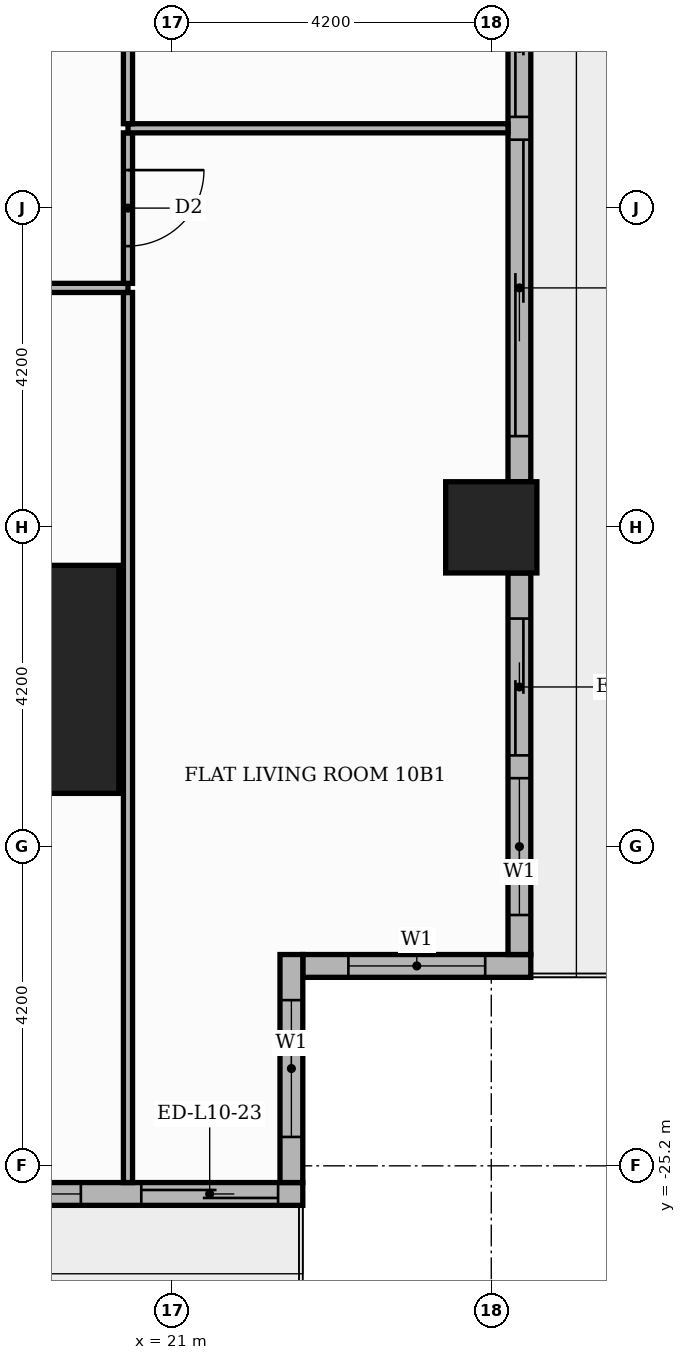
"""IFC4 building model, lengths in metres.
Left out: names, types, materials, properties, quantities, classifications, styles, units other than length and angle.
Written with IfcOpenShell. Run it as: python <this file> out.ifc"""

import sys

from ifc_helpers import new_model, si_unit, direction, frame, frame_2d, origin, origin_2d, place, context, subcontext, project, spatial, rectangle, extrude, element, fill, save


model = new_model("IFC4")
c1 = context("Model", 3, precision=1e-05, world=origin(), true_north=direction((0.0, 1.0)))
c2 = subcontext(c1, "Body", "Model", "MODEL_VIEW")
j1 = project(units=[si_unit("LENGTHUNIT", "METRE"), si_unit("PLANEANGLEUNIT", "RADIAN")], contexts=[c1])
p1 = place(None, origin())
s1 = spatial("IfcSite", under=j1, at=p1, CompositionType="ELEMENT")
p2 = place(p1, origin())
s2 = spatial("IfcBuilding", under=s1, at=p2, CompositionType="ELEMENT")
p3 = place(p2, frame((0.0, 0.0, 46.5)))
s3 = spatial("IfcBuildingStorey", under=s2, at=p3, CompositionType="ELEMENT", Elevation=46.5)
p4 = place(p3, frame((18.8, -18.8, 0.0), z_axis=(0.0, 0.0, 1.0), x_axis=(1.0, 0.0, 0.0)))
e1 = element("IfcColumn", 1, at=p4, inside=s3, PredefinedType="COLUMN", context=c2, shape_type="SweptSolid", body=[
    extrude(rectangle(XDim=3.0, YDim=3.0, at=origin_2d()), origin(), (0.0, 0.0, 1.0), 3.9),
])
p5 = place(p3, frame((25.2, -16.8, 0.0), z_axis=(0.0, 0.0, 1.0), x_axis=(1.0, 0.0, 0.0)))
e2 = element("IfcColumn", 2, at=p5, inside=s3, PredefinedType="COLUMN", context=c2, shape_type="SweptSolid", body=[
    extrude(rectangle(XDim=1.2, YDim=1.2, at=origin_2d()), origin(), (0.0, 0.0, 1.0), 3.9),
])
p6 = place(p3, frame((22.72, -22.57, 0.0), z_axis=(0.0, 0.0, 1.0), x_axis=(1.0, 0.0, 0.0)))
e3 = element("IfcWall", 3, at=p6, inside=s3, PredefinedType="STANDARD", context=c2, shape_type="SweptSolid", body=[
    extrude(rectangle(XDim=3.0, YDim=0.3, at=frame_2d((1.5, 0.0))), origin(), (0.0, 0.0, 1.0), 3.48),
])
p7 = place(p6, frame((0.6, 0.0, 0.9)))
e4 = element("IfcOpeningElement", 4, at=p7, cuts=e3, PredefinedType="OPENING", context=c2, shape_type="SweptSolid", body=[
    extrude(rectangle(XDim=1.8, YDim=2.1, at=frame_2d((0.9, 1.05))), frame((0.0, 0.16, 0.0), z_axis=(0.0, -1.0, 0.0), x_axis=(1.0, 0.0, 0.0)), (0.0, 0.0, 1.0), 0.32),
])
p8 = place(p3, frame((25.57, -22.42, 0.0), z_axis=(0.0, 0.0, 1.0), x_axis=(0.0, 1.0, 0.0)))
e5 = element("IfcWall", 5, at=p8, inside=s3, PredefinedType="STANDARD", context=c2, shape_type="SweptSolid", body=[
    extrude(rectangle(XDim=5.02, YDim=0.3, at=frame_2d((2.51, 0.0))), origin(), (0.0, 0.0, 1.0), 3.48),
])
p9 = place(p8, frame((0.52, 0.0, 0.9)))
e6 = element("IfcOpeningElement", 6, at=p9, cuts=e5, PredefinedType="OPENING", context=c2, shape_type="SweptSolid", body=[
    extrude(rectangle(XDim=1.8, YDim=2.1, at=frame_2d((0.9, 1.05))), frame((0.0, 0.16, 0.0), z_axis=(0.0, -1.0, 0.0), x_axis=(1.0, 0.0, 0.0)), (0.0, 0.0, 1.0), 0.32),
])
p10 = place(p8, frame((2.62, 0.0, 0.0)))
e7 = element("IfcOpeningElement", 7, at=p10, cuts=e5, PredefinedType="OPENING", context=c2, shape_type="SweptSolid", body=[
    extrude(rectangle(XDim=1.8, YDim=2.4, at=frame_2d((0.9, 1.2))), frame((0.0, 0.16, 0.0), z_axis=(0.0, -1.0, 0.0), x_axis=(1.0, 0.0, 0.0)), (0.0, 0.0, 1.0), 0.32),
])
p11 = place(p3, frame((25.57, -16.2, 0.0), z_axis=(0.0, 0.0, 1.0), x_axis=(0.0, 1.0, 0.0)))
e8 = element("IfcWall", 8, at=p11, inside=s3, PredefinedType="STANDARD", context=c2, shape_type="SweptSolid", body=[
    extrude(rectangle(XDim=7.2, YDim=0.3, at=frame_2d((3.6, 0.0))), origin(), (0.0, 0.0, 1.0), 3.48),
])
p12 = place(p11, frame((0.6, 0.0, 0.0)))
e9 = element("IfcOpeningElement", 9, at=p12, cuts=e8, PredefinedType="OPENING", context=c2, shape_type="SweptSolid", body=[
    extrude(rectangle(XDim=3.9, YDim=2.4, at=frame_2d((1.95, 1.2))), frame((0.0, 0.16, 0.0), z_axis=(0.0, -1.0, 0.0), x_axis=(1.0, 0.0, 0.0)), (0.0, 0.0, 1.0), 0.32),
])
p13 = place(p11, frame((4.8, 0.0, 0.0)))
e10 = element("IfcOpeningElement", 10, at=p13, cuts=e8, PredefinedType="OPENING", context=c2, shape_type="SweptSolid", body=[
    extrude(rectangle(XDim=1.8, YDim=2.4, at=frame_2d((0.9, 1.2))), frame((0.0, 0.16, 0.0), z_axis=(0.0, -1.0, 0.0), x_axis=(1.0, 0.0, 0.0)), (0.0, 0.0, 1.0), 0.32),
])
p14 = place(p3, frame((17.4, -25.57, 0.0), z_axis=(0.0, 0.0, 1.0), x_axis=(1.0, 0.0, 0.0)))
e11 = element("IfcWall", 11, at=p14, inside=s3, PredefinedType="STANDARD", context=c2, shape_type="SweptSolid", body=[
    extrude(rectangle(XDim=5.32, YDim=0.3, at=frame_2d((2.66, 0.0))), origin(), (0.0, 0.0, 1.0), 3.48),
])
p15 = place(p14, frame((0.6, 0.0, 0.9)))
e12 = element("IfcOpeningElement", 12, at=p15, cuts=e11, PredefinedType="OPENING", context=c2, shape_type="SweptSolid", body=[
    extrude(rectangle(XDim=1.8, YDim=2.1, at=frame_2d((0.9, 1.05))), frame((0.0, 0.16, 0.0), z_axis=(0.0, -1.0, 0.0), x_axis=(1.0, 0.0, 0.0)), (0.0, 0.0, 1.0), 0.32),
])
p16 = place(p14, frame((3.195, 0.0, 0.0)))
e13 = element("IfcOpeningElement", 13, at=p16, cuts=e11, PredefinedType="OPENING", context=c2, shape_type="SweptSolid", body=[
    extrude(rectangle(XDim=1.8, YDim=2.4, at=frame_2d((0.9, 1.2))), frame((0.0, 0.16, 0.0), z_axis=(0.0, -1.0, 0.0), x_axis=(1.0, 0.0, 0.0)), (0.0, 0.0, 1.0), 0.32),
])
p17 = place(p3, frame((22.57, -25.42, 0.0), z_axis=(0.0, 0.0, 1.0), x_axis=(0.0, 1.0, 0.0)))
e14 = element("IfcWall", 14, at=p17, inside=s3, PredefinedType="STANDARD", context=c2, shape_type="SweptSolid", body=[
    extrude(rectangle(XDim=3.0, YDim=0.3, at=frame_2d((1.5, 0.0))), origin(), (0.0, 0.0, 1.0), 3.48),
])
p18 = place(p17, frame((0.6, 0.0, 0.9)))
e15 = element("IfcOpeningElement", 15, at=p18, cuts=e14, PredefinedType="OPENING", context=c2, shape_type="SweptSolid", body=[
    extrude(rectangle(XDim=1.8, YDim=2.1, at=frame_2d((0.9, 1.05))), frame((0.0, 0.16, 0.0), z_axis=(0.0, -1.0, 0.0), x_axis=(1.0, 0.0, 0.0)), (0.0, 0.0, 1.0), 0.32),
])
p19 = place(p3, frame((20.42, -25.42, 0.0), z_axis=(0.0, 0.0, 1.0), x_axis=(0.0, 1.0, 0.0)))
e16 = element("IfcWall", 16, at=p19, inside=s3, PredefinedType="PARTITIONING", context=c2, shape_type="SweptSolid", body=[
    extrude(rectangle(XDim=11.71, YDim=0.12, at=frame_2d((5.855, 0.0))), origin(), (0.0, 0.0, 1.0), 3.48),
])
p20 = place(p3, frame((13.65, -13.65, 0.0), z_axis=(0.0, 0.0, 1.0), x_axis=(1.0, 0.0, 0.0)))
e17 = element("IfcWall", 17, at=p20, inside=s3, PredefinedType="PARTITIONING", context=c2, shape_type="SweptSolid", body=[
    extrude(rectangle(XDim=6.77, YDim=0.12, at=frame_2d((3.385, 0.0))), origin(), (0.0, 0.0, 1.0), 3.48),
])
p21 = place(p20, frame((2.885, 0.0, 0.0)))
e18 = element("IfcOpeningElement", 18, at=p21, cuts=e17, PredefinedType="OPENING", context=c2, shape_type="SweptSolid", body=[
    extrude(rectangle(XDim=1.0, YDim=2.1, at=frame_2d((0.5, 1.05))), frame((0.0, 0.07, 0.0), z_axis=(0.0, -1.0, 0.0), x_axis=(1.0, 0.0, 0.0)), (0.0, 0.0, 1.0), 0.14),
])
p22 = place(p3, frame((20.42, -13.59, 0.0), z_axis=(0.0, 0.0, 1.0), x_axis=(0.0, 1.0, 0.0)))
e19 = element("IfcWall", 19, at=p22, inside=s3, PredefinedType="PARTITIONING", context=c2, shape_type="SweptSolid", body=[
    extrude(rectangle(XDim=1.98, YDim=0.12, at=frame_2d((0.99, 0.0))), origin(), (0.0, 0.0, 1.0), 3.48),
])
p23 = place(p22, frame((0.49, 0.0, 0.0)))
e20 = element("IfcOpeningElement", 20, at=p23, cuts=e19, PredefinedType="OPENING", context=c2, shape_type="SweptSolid", body=[
    extrude(rectangle(XDim=1.0, YDim=2.1, at=frame_2d((0.5, 1.05))), frame((0.0, 0.07, 0.0), z_axis=(0.0, -1.0, 0.0), x_axis=(1.0, 0.0, 0.0)), (0.0, 0.0, 1.0), 0.14),
])
p24 = place(p3, frame((20.42, -11.55, 0.0), z_axis=(0.0, 0.0, 1.0), x_axis=(1.0, 0.0, 0.0)))
e21 = element("IfcWall", 21, at=p24, inside=s3, PredefinedType="PARTITIONING", context=c2, shape_type="SweptSolid", body=[
    extrude(rectangle(XDim=5.0, YDim=0.12, at=frame_2d((2.5, 0.0))), origin(), (0.0, 0.0, 1.0), 3.48),
])
p25 = place(p3, frame((20.42, -11.49, 0.0), z_axis=(0.0, 0.0, 1.0), x_axis=(0.0, 1.0, 0.0)))
e22 = element("IfcWall", 22, at=p25, inside=s3, PredefinedType="PARTITIONING", context=c2, shape_type="SweptSolid", body=[
    extrude(rectangle(XDim=8.28, YDim=0.12, at=frame_2d((4.14, 0.0))), origin(), (0.0, 0.0, 1.0), 3.48),
])
p26 = place(p25, frame((3.69, 0.0, 0.0)))
e23 = element("IfcOpeningElement", 23, at=p26, cuts=e22, PredefinedType="OPENING", context=c2, shape_type="SweptSolid", body=[
    extrude(rectangle(XDim=0.9, YDim=2.1, at=frame_2d((0.45, 1.05))), frame((0.0, 0.07, 0.0), z_axis=(0.0, -1.0, 0.0), x_axis=(1.0, 0.0, 0.0)), (0.0, 0.0, 1.0), 0.14),
])
p27 = place(p7, origin())
e24 = element("IfcWindow", 24, at=p27, inside=s3, PartitioningType="SINGLE_PANEL", PredefinedType="WINDOW", context=c2, shape_type="SweptSolid", body=[
    extrude(rectangle(XDim=1.8, YDim=2.1, at=frame_2d((0.9, 1.05))), frame((0.0, 0.03, 0.0), z_axis=(0.0, -1.0, 0.0), x_axis=(1.0, 0.0, 0.0)), (0.0, 0.0, 1.0), 0.06),
])
fill(e4, e24)
p28 = place(p9, origin())
e25 = element("IfcWindow", 25, at=p28, inside=s3, PartitioningType="SINGLE_PANEL", PredefinedType="WINDOW", context=c2, shape_type="SweptSolid", body=[
    extrude(rectangle(XDim=1.8, YDim=2.1, at=frame_2d((0.9, 1.05))), frame((0.0, 0.03, 0.0), z_axis=(0.0, -1.0, 0.0), x_axis=(1.0, 0.0, 0.0)), (0.0, 0.0, 1.0), 0.06),
])
fill(e6, e25)
p29 = place(p10, origin())
e26 = element("IfcDoor", 26, at=p29, inside=s3, OperationType="SLIDING_TO_RIGHT", PredefinedType="DOOR", context=c2, shape_type="SweptSolid", body=[
    extrude(rectangle(XDim=1.8, YDim=2.4, at=frame_2d((0.9, 1.2))), frame((0.0, 0.025, 0.0), z_axis=(0.0, -1.0, 0.0), x_axis=(1.0, 0.0, 0.0)), (0.0, 0.0, 1.0), 0.05),
])
fill(e7, e26)
p30 = place(p12, origin())
e27 = element("IfcDoor", 27, at=p30, inside=s3, OperationType="SLIDING_TO_LEFT", PredefinedType="DOOR", context=c2, shape_type="SweptSolid", body=[
    extrude(rectangle(XDim=3.9, YDim=2.4, at=frame_2d((1.95, 1.2))), frame((0.0, 0.025, 0.0), z_axis=(0.0, -1.0, 0.0), x_axis=(1.0, 0.0, 0.0)), (0.0, 0.0, 1.0), 0.05),
])
fill(e9, e27)
p31 = place(p13, origin())
e28 = element("IfcDoor", 28, at=p31, inside=s3, OperationType="SLIDING_TO_RIGHT", PredefinedType="DOOR", context=c2, shape_type="SweptSolid", body=[
    extrude(rectangle(XDim=1.8, YDim=2.4, at=frame_2d((0.9, 1.2))), frame((0.0, 0.025, 0.0), z_axis=(0.0, -1.0, 0.0), x_axis=(1.0, 0.0, 0.0)), (0.0, 0.0, 1.0), 0.05),
])
fill(e10, e28)
p32 = place(p15, origin())
e29 = element("IfcWindow", 29, at=p32, inside=s3, PartitioningType="SINGLE_PANEL", PredefinedType="WINDOW", context=c2, shape_type="SweptSolid", body=[
    extrude(rectangle(XDim=1.8, YDim=2.1, at=frame_2d((0.9, 1.05))), frame((0.0, 0.03, 0.0), z_axis=(0.0, -1.0, 0.0), x_axis=(1.0, 0.0, 0.0)), (0.0, 0.0, 1.0), 0.06),
])
fill(e12, e29)
p33 = place(p16, origin())
e30 = element("IfcDoor", 30, at=p33, inside=s3, OperationType="SLIDING_TO_RIGHT", PredefinedType="DOOR", context=c2, shape_type="SweptSolid", body=[
    extrude(rectangle(XDim=1.8, YDim=2.4, at=frame_2d((0.9, 1.2))), frame((0.0, 0.025, 0.0), z_axis=(0.0, -1.0, 0.0), x_axis=(1.0, 0.0, 0.0)), (0.0, 0.0, 1.0), 0.05),
])
fill(e13, e30)
p34 = place(p18, origin())
e31 = element("IfcWindow", 31, at=p34, inside=s3, PartitioningType="SINGLE_PANEL", PredefinedType="WINDOW", context=c2, shape_type="SweptSolid", body=[
    extrude(rectangle(XDim=1.8, YDim=2.1, at=frame_2d((0.9, 1.05))), frame((0.0, 0.03, 0.0), z_axis=(0.0, -1.0, 0.0), x_axis=(1.0, 0.0, 0.0)), (0.0, 0.0, 1.0), 0.06),
])
fill(e15, e31)
p35 = place(p23, frame((1.0, 0.0, 0.0), z_axis=(0.0, 0.0, 1.0), x_axis=(-1.0, 0.0, 0.0)))
e32 = element("IfcDoor", 32, at=p35, inside=s3, OperationType="SINGLE_SWING_RIGHT", PredefinedType="DOOR", context=c2, shape_type="SweptSolid", body=[
    extrude(rectangle(XDim=1.0, YDim=2.1, at=frame_2d((0.5, 1.05))), frame((0.0, 0.025, 0.0), z_axis=(0.0, -1.0, 0.0), x_axis=(1.0, 0.0, 0.0)), (0.0, 0.0, 1.0), 0.05),
])
fill(e20, e32)
save(model, sys.argv[1])
